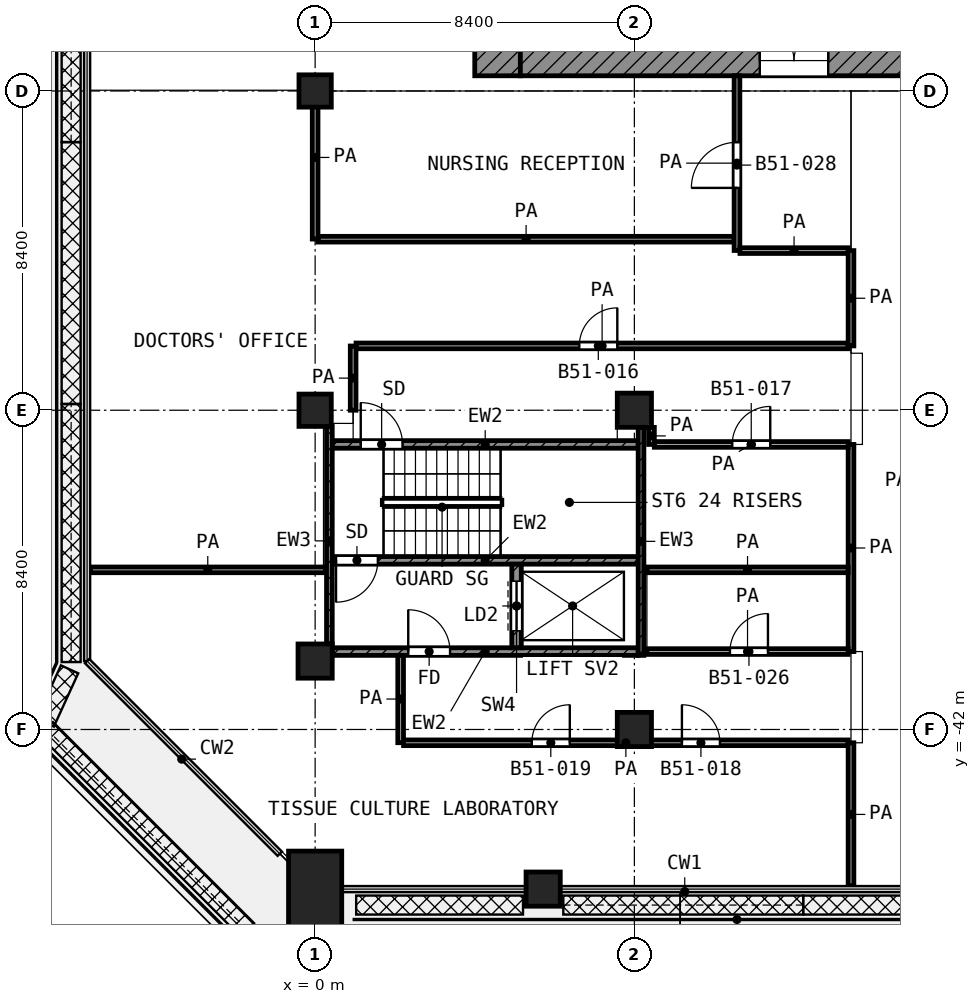
"""IFC4 building model, lengths in metres.
Left out: names, types, materials, properties, quantities, classifications, styles, units other than length and angle.
Written with IfcOpenShell. Run it as: python <this file> out.ifc"""

import sys

from ifc_helpers import new_model, si_unit, direction, frame, frame_2d, origin, origin_2d, place, context, subcontext, project, spatial, rectangle, extrude, element, fill, save


model = new_model("IFC4")
c1 = context("Model", 3, precision=1e-05, world=origin(), true_north=direction((0.0, 1.0)))
c2 = subcontext(c1, "Body", "Model", "MODEL_VIEW")
j1 = project(units=[si_unit("LENGTHUNIT", "METRE"), si_unit("PLANEANGLEUNIT", "RADIAN")], contexts=[c1])
p1 = place(None, origin())
s1 = spatial("IfcSite", under=j1, at=p1, CompositionType="ELEMENT")
p2 = place(p1, origin())
s2 = spatial("IfcBuilding", under=s1, at=p2, CompositionType="ELEMENT")
p3 = place(p2, frame((0.0, 0.0, 222.2)))
s3 = spatial("IfcBuildingStorey", under=s2, at=p3, CompositionType="ELEMENT", Elevation=222.2)
for number, where, z_axis, x_axis in (
    (1, (0.0, -25.2, 0.0), (0.0, 0.0, 1.0), (1.0, 0.0, 0.0)),
    (2, (0.0, -33.6, 0.0), (0.0, 0.0, 1.0), (1.0, 0.0, 0.0)),
):
    element("IfcColumn", number, at=place(p3, frame(where, z_axis=z_axis, x_axis=x_axis)), inside=s3, PredefinedType="COLUMN", context=c2, shape_type="SweptSolid", body=[
        extrude(rectangle(XDim=0.85, YDim=0.85, at=origin_2d()), origin(), (0.0, 0.0, 1.0), 4.2),
    ])
for number, where, z_axis, x_axis in (
    (3, (8.4, -33.6, 0.0), (0.0, 0.0, 1.0), (1.0, 0.0, 0.0)),
    (4, (0.0, -40.2, 0.0), (0.0, 0.0, 1.0), (1.0, 0.0, 0.0)),
    (5, (8.4, -42.0, 0.0), (0.0, 0.0, 1.0), (1.0, 0.0, 0.0)),
    (6, (6.0, -46.2, 0.0), (0.0, 0.0, 1.0), (1.0, 0.0, 0.0)),
):
    element("IfcColumn", number, at=place(p3, frame(where, z_axis=z_axis, x_axis=x_axis)), inside=s3, PredefinedType="COLUMN", context=c2, shape_type="SweptSolid", body=[
        extrude(rectangle(XDim=0.9, YDim=0.9, at=origin_2d()), origin(), (0.0, 0.0, 1.0), 4.2),
    ])
p4 = place(p3, frame((0.0, -46.2, 0.0), z_axis=(0.0, 0.0, 1.0), x_axis=(0.0, 1.0, 0.0)))
e7 = element("IfcColumn", 7, at=p4, inside=s3, PredefinedType="COLUMN", context=c2, shape_type="SweptSolid", body=[
    extrude(rectangle(XDim=2.0, YDim=1.4, at=origin_2d()), origin(), (0.0, 0.0, 1.0), 4.2),
])
p5 = place(p3, frame((4.8, -24.8, 0.0), z_axis=(0.0, 0.0, 1.0), x_axis=(0.0, 1.0, 0.0)))
e8 = element("IfcWall", 8, at=p5, inside=s3, PredefinedType="SHEAR", context=c2, shape_type="SweptSolid", body=[
    extrude(rectangle(XDim=19.4, YDim=1.2, at=frame_2d((9.7, 0.0))), origin(), (0.0, 0.0, 1.0), 3.6),
])
p6 = place(p5, frame((11.25, 0.0, 0.0)))
e9 = element("IfcOpeningElement", 9, at=p6, cuts=e8, PredefinedType="OPENING", context=c2, shape_type="SweptSolid", body=[
    extrude(rectangle(XDim=1.1, YDim=2.1, at=frame_2d((0.55, 1.05))), frame((0.0, 0.61, 0.0), z_axis=(0.0, -1.0, 0.0), x_axis=(1.0, 0.0, 0.0)), (0.0, 0.0, 1.0), 1.22),
])
p7 = place(p5, frame((1.95, 0.0, 0.0)))
e10 = element("IfcOpeningElement", 10, at=p7, cuts=e8, PredefinedType="OPENING", context=c2, shape_type="SweptSolid", body=[
    extrude(rectangle(XDim=1.1, YDim=2.1, at=frame_2d((0.55, 1.05))), frame((0.0, 0.61, 0.0), z_axis=(0.0, -1.0, 0.0), x_axis=(1.0, 0.0, 0.0)), (0.0, 0.0, 1.0), 1.22),
])
p8 = place(p3, frame((5.4, -24.4, 0.0), z_axis=(0.0, 0.0, 1.0), x_axis=(1.0, 0.0, 0.0)))
e11 = element("IfcWall", 11, at=p8, inside=s3, PredefinedType="SHEAR", context=c2, shape_type="SweptSolid", body=[
    extrude(rectangle(XDim=18.6, YDim=0.8, at=frame_2d((9.3, 0.0))), origin(), (0.0, 0.0, 1.0), 3.6),
])
p9 = place(p8, frame((6.3, 0.0, 0.0)))
e12 = element("IfcOpeningElement", 12, at=p9, cuts=e11, PredefinedType="OPENING", context=c2, shape_type="SweptSolid", body=[
    extrude(rectangle(XDim=1.8, YDim=2.1, at=frame_2d((0.9, 1.05))), frame((0.0, 0.41, 0.0), z_axis=(0.0, -1.0, 0.0), x_axis=(1.0, 0.0, 0.0)), (0.0, 0.0, 1.0), 0.82),
])
p10 = place(p3, frame((0.375, -40.05, 0.0), z_axis=(0.0, 0.0, 1.0), x_axis=(0.0, 1.0, 0.0)))
e13 = element("IfcWall", 13, at=p10, inside=s3, PredefinedType="SHEAR", context=c2, shape_type="SweptSolid", body=[
    extrude(rectangle(XDim=6.025, YDim=0.15, at=frame_2d((3.013, 0.0))), origin(), (0.0, 0.0, 1.0), 3.6),
])
p11 = place(p3, frame((8.575, -40.05, 0.0), z_axis=(0.0, 0.0, 1.0), x_axis=(0.0, 1.0, 0.0)))
e14 = element("IfcWall", 14, at=p11, inside=s3, PredefinedType="SHEAR", context=c2, shape_type="SweptSolid", body=[
    extrude(rectangle(XDim=6.0, YDim=0.15, at=frame_2d((3.0, 0.0))), origin(), (0.0, 0.0, 1.0), 3.6),
])
p12 = place(p3, frame((0.45, -34.5, 0.0), z_axis=(0.0, 0.0, 1.0), x_axis=(1.0, 0.0, 0.0)))
e15 = element("IfcWall", 15, at=p12, inside=s3, PredefinedType="SHEAR", context=c2, shape_type="SweptSolid", body=[
    extrude(rectangle(XDim=8.05, YDim=0.2, at=frame_2d((4.025, 0.0))), origin(), (0.0, 0.0, 1.0), 3.6),
])
p13 = place(p12, frame((0.75, 0.0, 0.0)))
e16 = element("IfcOpeningElement", 16, at=p13, cuts=e15, PredefinedType="OPENING", context=c2, shape_type="SweptSolid", body=[
    extrude(rectangle(XDim=1.1, YDim=2.1, at=frame_2d((0.55, 1.05))), frame((0.0, 0.11, 0.0), z_axis=(0.0, -1.0, 0.0), x_axis=(1.0, 0.0, 0.0)), (0.0, 0.0, 1.0), 0.22),
])
p14 = place(p3, frame((0.45, -37.55, 0.0), z_axis=(0.0, 0.0, 1.0), x_axis=(1.0, 0.0, 0.0)))
e17 = element("IfcWall", 17, at=p14, inside=s3, PredefinedType="SHEAR", context=c2, shape_type="SweptSolid", body=[
    extrude(rectangle(XDim=8.05, YDim=0.2, at=frame_2d((4.025, 0.0))), origin(), (0.0, 0.0, 1.0), 3.6),
])
p15 = place(p14, frame((0.1, 0.0, 0.0)))
e18 = element("IfcOpeningElement", 18, at=p15, cuts=e17, PredefinedType="OPENING", context=c2, shape_type="SweptSolid", body=[
    extrude(rectangle(XDim=1.1, YDim=2.1, at=frame_2d((0.55, 1.05))), frame((0.0, 0.11, 0.0), z_axis=(0.0, -1.0, 0.0), x_axis=(1.0, 0.0, 0.0)), (0.0, 0.0, 1.0), 0.22),
])
p16 = place(p3, frame((0.45, -39.95, 0.0), z_axis=(0.0, 0.0, 1.0), x_axis=(1.0, 0.0, 0.0)))
e19 = element("IfcWall", 19, at=p16, inside=s3, PredefinedType="SHEAR", context=c2, shape_type="SweptSolid", body=[
    extrude(rectangle(XDim=8.05, YDim=0.2, at=frame_2d((4.025, 0.0))), origin(), (0.0, 0.0, 1.0), 3.6),
])
p17 = place(p16, frame((2.0, 0.0, 0.0)))
e20 = element("IfcOpeningElement", 20, at=p17, cuts=e19, PredefinedType="OPENING", context=c2, shape_type="SweptSolid", body=[
    extrude(rectangle(XDim=1.1, YDim=2.1, at=frame_2d((0.55, 1.05))), frame((0.0, 0.11, 0.0), z_axis=(0.0, -1.0, 0.0), x_axis=(1.0, 0.0, 0.0)), (0.0, 0.0, 1.0), 0.22),
])
p18 = place(p3, frame((5.3, -39.85, 0.0), z_axis=(0.0, 0.0, 1.0), x_axis=(0.0, 1.0, 0.0)))
e21 = element("IfcWall", 21, at=p18, inside=s3, PredefinedType="SHEAR", context=c2, shape_type="SweptSolid", body=[
    extrude(rectangle(XDim=2.2, YDim=0.25, at=frame_2d((1.1, 0.0))), origin(), (0.0, 0.0, 1.0), 3.6),
])
p19 = place(p18, frame((0.45, 0.0, 0.0)))
e22 = element("IfcOpeningElement", 22, at=p19, cuts=e21, PredefinedType="OPENING", context=c2, shape_type="SweptSolid", body=[
    extrude(rectangle(XDim=1.3, YDim=2.1, at=frame_2d((0.65, 1.05))), frame((0.0, 0.135, 0.0), z_axis=(0.0, -1.0, 0.0), x_axis=(1.0, 0.0, 0.0)), (0.0, 0.0, 1.0), 0.27),
])
p20 = place(p3, frame((2.327, -42.35, 0.0), z_axis=(0.0, 0.0, 1.0), x_axis=(1.0, 0.0, 0.0)))
e23 = element("IfcWall", 23, at=p20, inside=s3, PredefinedType="PARTITIONING", context=c2, shape_type="SweptSolid", body=[
    extrude(rectangle(XDim=11.698, YDim=0.15, at=frame_2d((5.849, 0.0))), origin(), (0.0, 0.0, 1.0), 3.6),
])
p21 = place(p20, frame((7.324, 0.0, 0.0)))
e24 = element("IfcOpeningElement", 24, at=p21, cuts=e23, PredefinedType="OPENING", context=c2, shape_type="SweptSolid", body=[
    extrude(rectangle(XDim=1.0, YDim=2.1, at=frame_2d((0.5, 1.05))), frame((0.0, 0.085, 0.0), z_axis=(0.0, -1.0, 0.0), x_axis=(1.0, 0.0, 0.0)), (0.0, 0.0, 1.0), 0.17),
])
p22 = place(p20, frame((3.374, 0.0, 0.0)))
e25 = element("IfcOpeningElement", 25, at=p22, cuts=e23, PredefinedType="OPENING", context=c2, shape_type="SweptSolid", body=[
    extrude(rectangle(XDim=1.0, YDim=2.1, at=frame_2d((0.5, 1.05))), frame((0.0, 0.085, 0.0), z_axis=(0.0, -1.0, 0.0), x_axis=(1.0, 0.0, 0.0)), (0.0, 0.0, 1.0), 0.17),
])
p23 = place(p3, frame((8.73, -39.95, 0.0), z_axis=(0.0, 0.0, 1.0), x_axis=(1.0, 0.0, 0.0)))
e26 = element("IfcWall", 26, at=p23, inside=s3, PredefinedType="PARTITIONING", context=c2, shape_type="SweptSolid", body=[
    extrude(rectangle(XDim=5.295, YDim=0.15, at=frame_2d((2.647, 0.0))), origin(), (0.0, 0.0, 1.0), 3.6),
])
p24 = place(p23, frame((2.185, 0.0, 0.0)))
e27 = element("IfcOpeningElement", 27, at=p24, cuts=e26, PredefinedType="OPENING", context=c2, shape_type="SweptSolid", body=[
    extrude(rectangle(XDim=1.0, YDim=2.1, at=frame_2d((0.5, 1.05))), frame((0.0, 0.085, 0.0), z_axis=(0.0, -1.0, 0.0), x_axis=(1.0, 0.0, 0.0)), (0.0, 0.0, 1.0), 0.17),
])
p25 = place(p3, frame((-5.92, -37.8, 0.0), z_axis=(0.0, 0.0, 1.0), x_axis=(1.0, 0.0, 0.0)))
e28 = element("IfcWall", 28, at=p25, inside=s3, PredefinedType="PARTITIONING", context=c2, shape_type="SweptSolid", body=[
    extrude(rectangle(XDim=6.19, YDim=0.15, at=frame_2d((3.095, 0.0))), origin(), (0.0, 0.0, 1.0), 3.6),
])
p26 = place(p3, frame((8.73, -37.8, 0.0), z_axis=(0.0, 0.0, 1.0), x_axis=(1.0, 0.0, 0.0)))
e29 = element("IfcWall", 29, at=p26, inside=s3, PredefinedType="PARTITIONING", context=c2, shape_type="SweptSolid", body=[
    extrude(rectangle(XDim=5.295, YDim=0.15, at=frame_2d((2.647, 0.0))), origin(), (0.0, 0.0, 1.0), 3.6),
])
p27 = place(p3, frame((8.925, -34.5, 0.0), z_axis=(0.0, 0.0, 1.0), x_axis=(1.0, 0.0, 0.0)))
e30 = element("IfcWall", 30, at=p27, inside=s3, PredefinedType="PARTITIONING", context=c2, shape_type="SweptSolid", body=[
    extrude(rectangle(XDim=5.1, YDim=0.15, at=frame_2d((2.55, 0.0))), origin(), (0.0, 0.0, 1.0), 3.6),
])
p28 = place(p27, frame((2.05, 0.0, 0.0)))
e31 = element("IfcOpeningElement", 31, at=p28, cuts=e30, PredefinedType="OPENING", context=c2, shape_type="SweptSolid", body=[
    extrude(rectangle(XDim=1.0, YDim=2.1, at=frame_2d((0.5, 1.05))), frame((0.0, 0.085, 0.0), z_axis=(0.0, -1.0, 0.0), x_axis=(1.0, 0.0, 0.0)), (0.0, 0.0, 1.0), 0.17),
])
p29 = place(p3, frame((1.077, -31.907, 0.0), z_axis=(0.0, 0.0, 1.0), x_axis=(1.0, 0.0, 0.0)))
e32 = element("IfcWall", 32, at=p29, inside=s3, PredefinedType="PARTITIONING", context=c2, shape_type="SweptSolid", body=[
    extrude(rectangle(XDim=12.948, YDim=0.15, at=frame_2d((6.474, 0.0))), origin(), (0.0, 0.0, 1.0), 3.6),
])
p30 = place(p29, frame((5.874, 0.0, 0.0)))
e33 = element("IfcOpeningElement", 33, at=p30, cuts=e32, PredefinedType="OPENING", context=c2, shape_type="SweptSolid", body=[
    extrude(rectangle(XDim=1.0, YDim=2.1, at=frame_2d((0.5, 1.05))), frame((0.0, 0.085, 0.0), z_axis=(0.0, -1.0, 0.0), x_axis=(1.0, 0.0, 0.0)), (0.0, 0.0, 1.0), 0.17),
])
p31 = place(p3, frame((11.178, -29.4, 0.0), z_axis=(0.0, 0.0, 1.0), x_axis=(1.0, 0.0, 0.0)))
e34 = element("IfcWall", 34, at=p31, inside=s3, PredefinedType="PARTITIONING", context=c2, shape_type="SweptSolid", body=[
    extrude(rectangle(XDim=2.847, YDim=0.15, at=frame_2d((1.423, 0.0))), origin(), (0.0, 0.0, 1.0), 3.6),
])
p32 = place(p3, frame((0.077, -29.1, 0.0), z_axis=(0.0, 0.0, 1.0), x_axis=(1.0, 0.0, 0.0)))
e35 = element("IfcWall", 35, at=p32, inside=s3, PredefinedType="PARTITIONING", context=c2, shape_type="SweptSolid", body=[
    extrude(rectangle(XDim=10.948, YDim=0.15, at=frame_2d((5.474, 0.0))), origin(), (0.0, 0.0, 1.0), 3.6),
])
p33 = place(p3, frame((0.0, -29.097, 0.0), z_axis=(0.0, 0.0, 1.0), x_axis=(0.0, 1.0, 0.0)))
e36 = element("IfcWall", 36, at=p33, inside=s3, PredefinedType="PARTITIONING", context=c2, shape_type="SweptSolid", body=[
    extrude(rectangle(XDim=4.297, YDim=0.15, at=frame_2d((2.148, 0.0))), origin(), (0.0, 0.0, 1.0), 3.6),
])
p34 = place(p3, frame((1.0, -33.6, 0.0), z_axis=(0.0, 0.0, 1.0), x_axis=(0.0, 1.0, 0.0)))
e37 = element("IfcWall", 37, at=p34, inside=s3, PredefinedType="PARTITIONING", context=c2, shape_type="SweptSolid", body=[
    extrude(rectangle(XDim=1.69, YDim=0.15, at=frame_2d((0.845, 0.0))), origin(), (0.0, 0.0, 1.0), 3.6),
])
p35 = place(p3, frame((2.25, -42.348, 0.0), z_axis=(0.0, 0.0, 1.0), x_axis=(0.0, 1.0, 0.0)))
e38 = element("IfcWall", 38, at=p35, inside=s3, PredefinedType="PARTITIONING", context=c2, shape_type="SweptSolid", body=[
    extrude(rectangle(XDim=2.298, YDim=0.15, at=frame_2d((1.149, 0.0))), origin(), (0.0, 0.0, 1.0), 3.6),
])
p36 = place(p3, frame((8.85, -34.5, 0.0), z_axis=(0.0, 0.0, 1.0), x_axis=(0.0, 1.0, 0.0)))
e39 = element("IfcWall", 39, at=p36, inside=s3, PredefinedType="PARTITIONING", context=c2, shape_type="SweptSolid", body=[
    extrude(rectangle(XDim=0.449, YDim=0.15, at=frame_2d((0.225, 0.0))), origin(), (0.0, 0.0, 1.0), 3.6),
])
p37 = place(p3, frame((11.1, -29.397, 0.0), z_axis=(0.0, 0.0, 1.0), x_axis=(0.0, 1.0, 0.0)))
e40 = element("IfcWall", 40, at=p37, inside=s3, PredefinedType="PARTITIONING", context=c2, shape_type="SweptSolid", body=[
    extrude(rectangle(XDim=4.597, YDim=0.15, at=frame_2d((2.298, 0.0))), origin(), (0.0, 0.0, 1.0), 3.6),
])
p38 = place(p37, frame((1.647, 0.0, 0.0)))
e41 = element("IfcOpeningElement", 41, at=p38, cuts=e40, PredefinedType="OPENING", context=c2, shape_type="SweptSolid", body=[
    extrude(rectangle(XDim=1.2, YDim=2.1, at=frame_2d((0.6, 1.05))), frame((0.0, 0.085, 0.0), z_axis=(0.0, -1.0, 0.0), x_axis=(1.0, 0.0, 0.0)), (0.0, 0.0, 1.0), 0.17),
])
p39 = place(p3, frame((14.1, -46.12, 0.0), z_axis=(0.0, 0.0, 1.0), x_axis=(0.0, 1.0, 0.0)))
e42 = element("IfcWall", 42, at=p39, inside=s3, PredefinedType="PARTITIONING", context=c2, shape_type="SweptSolid", body=[
    extrude(rectangle(XDim=3.77, YDim=0.15, at=frame_2d((1.885, 0.0))), origin(), (0.0, 0.0, 1.0), 3.6),
])
p40 = place(p3, frame((14.1, -39.95, 0.0), z_axis=(0.0, 0.0, 1.0), x_axis=(0.0, 1.0, 0.0)))
e43 = element("IfcWall", 43, at=p40, inside=s3, PredefinedType="PARTITIONING", context=c2, shape_type="SweptSolid", body=[
    extrude(rectangle(XDim=5.45, YDim=0.15, at=frame_2d((2.725, 0.0))), origin(), (0.0, 0.0, 1.0), 3.6),
])
p41 = place(p3, frame((14.1, -31.907, 0.0), z_axis=(0.0, 0.0, 1.0), x_axis=(0.0, 1.0, 0.0)))
e44 = element("IfcWall", 44, at=p41, inside=s3, PredefinedType="PARTITIONING", context=c2, shape_type="SweptSolid", body=[
    extrude(rectangle(XDim=2.507, YDim=0.15, at=frame_2d((1.253, 0.0))), origin(), (0.0, 0.0, 1.0), 3.6),
])
p42 = place(p9, origin())
e45 = element("IfcDoor", 45, at=p42, inside=s3, OperationType="DOUBLE_DOOR_SINGLE_SWING", PredefinedType="DOOR", context=c2, shape_type="SweptSolid", body=[
    extrude(rectangle(XDim=1.8, YDim=2.1, at=frame_2d((0.9, 1.05))), frame((0.0, 0.025, 0.0), z_axis=(0.0, -1.0, 0.0), x_axis=(1.0, 0.0, 0.0)), (0.0, 0.0, 1.0), 0.05),
])
fill(e12, e45)
p43 = place(p13, origin())
e46 = element("IfcDoor", 46, at=p43, inside=s3, OperationType="SINGLE_SWING_LEFT", PredefinedType="DOOR", context=c2, shape_type="SweptSolid", body=[
    extrude(rectangle(XDim=1.1, YDim=2.1, at=frame_2d((0.55, 1.05))), frame((0.0, 0.025, 0.0), z_axis=(0.0, -1.0, 0.0), x_axis=(1.0, 0.0, 0.0)), (0.0, 0.0, 1.0), 0.05),
])
fill(e16, e46)
p44 = place(p15, frame((1.1, 0.0, 0.0), z_axis=(0.0, 0.0, 1.0), x_axis=(-1.0, 0.0, 0.0)))
e47 = element("IfcDoor", 47, at=p44, inside=s3, OperationType="SINGLE_SWING_LEFT", PredefinedType="DOOR", context=c2, shape_type="SweptSolid", body=[
    extrude(rectangle(XDim=1.1, YDim=2.1, at=frame_2d((0.55, 1.05))), frame((0.0, 0.025, 0.0), z_axis=(0.0, -1.0, 0.0), x_axis=(1.0, 0.0, 0.0)), (0.0, 0.0, 1.0), 0.05),
])
fill(e18, e47)
p45 = place(p19, origin())
e48 = element("IfcDoor", 48, at=p45, inside=s3, OperationType="DOUBLE_DOOR_SLIDING", PredefinedType="DOOR", context=c2, shape_type="SweptSolid", body=[
    extrude(rectangle(XDim=1.3, YDim=2.1, at=frame_2d((0.65, 1.05))), frame((0.0, 0.025, 0.0), z_axis=(0.0, -1.0, 0.0), x_axis=(1.0, 0.0, 0.0)), (0.0, 0.0, 1.0), 0.05),
])
fill(e22, e48)
p46 = place(p17, origin())
e49 = element("IfcDoor", 49, at=p46, inside=s3, OperationType="SINGLE_SWING_LEFT", PredefinedType="DOOR", context=c2, shape_type="SweptSolid", body=[
    extrude(rectangle(XDim=1.1, YDim=2.1, at=frame_2d((0.55, 1.05))), frame((0.0, 0.025, 0.0), z_axis=(0.0, -1.0, 0.0), x_axis=(1.0, 0.0, 0.0)), (0.0, 0.0, 1.0), 0.05),
])
fill(e20, e49)
p47 = place(p38, origin())
e50 = element("IfcDoor", 50, at=p47, inside=s3, OperationType="SINGLE_SWING_LEFT", PredefinedType="DOOR", context=c2, shape_type="SweptSolid", body=[
    extrude(rectangle(XDim=1.2, YDim=2.1, at=frame_2d((0.6, 1.05))), frame((0.0, 0.025, 0.0), z_axis=(0.0, -1.0, 0.0), x_axis=(1.0, 0.0, 0.0)), (0.0, 0.0, 1.0), 0.05),
])
fill(e41, e50)
p48 = place(p30, origin())
e51 = element("IfcDoor", 51, at=p48, inside=s3, OperationType="SINGLE_SWING_RIGHT", PredefinedType="DOOR", context=c2, shape_type="SweptSolid", body=[
    extrude(rectangle(XDim=1.0, YDim=2.1, at=frame_2d((0.5, 1.05))), frame((0.0, 0.025, 0.0), z_axis=(0.0, -1.0, 0.0), x_axis=(1.0, 0.0, 0.0)), (0.0, 0.0, 1.0), 0.05),
])
fill(e33, e51)
p49 = place(p28, origin())
e52 = element("IfcDoor", 52, at=p49, inside=s3, OperationType="SINGLE_SWING_RIGHT", PredefinedType="DOOR", context=c2, shape_type="SweptSolid", body=[
    extrude(rectangle(XDim=1.0, YDim=2.1, at=frame_2d((0.5, 1.05))), frame((0.0, 0.025, 0.0), z_axis=(0.0, -1.0, 0.0), x_axis=(1.0, 0.0, 0.0)), (0.0, 0.0, 1.0), 0.05),
])
fill(e31, e52)
p50 = place(p21, origin())
e53 = element("IfcDoor", 53, at=p50, inside=s3, OperationType="SINGLE_SWING_LEFT", PredefinedType="DOOR", context=c2, shape_type="SweptSolid", body=[
    extrude(rectangle(XDim=1.0, YDim=2.1, at=frame_2d((0.5, 1.05))), frame((0.0, 0.025, 0.0), z_axis=(0.0, -1.0, 0.0), x_axis=(1.0, 0.0, 0.0)), (0.0, 0.0, 1.0), 0.05),
])
fill(e24, e53)
p51 = place(p22, origin())
e54 = element("IfcDoor", 54, at=p51, inside=s3, OperationType="SINGLE_SWING_RIGHT", PredefinedType="DOOR", context=c2, shape_type="SweptSolid", body=[
    extrude(rectangle(XDim=1.0, YDim=2.1, at=frame_2d((0.5, 1.05))), frame((0.0, 0.025, 0.0), z_axis=(0.0, -1.0, 0.0), x_axis=(1.0, 0.0, 0.0)), (0.0, 0.0, 1.0), 0.05),
])
fill(e25, e54)
p52 = place(p24, origin())
e55 = element("IfcDoor", 55, at=p52, inside=s3, OperationType="SINGLE_SWING_RIGHT", PredefinedType="DOOR", context=c2, shape_type="SweptSolid", body=[
    extrude(rectangle(XDim=1.0, YDim=2.1, at=frame_2d((0.5, 1.05))), frame((0.0, 0.025, 0.0), z_axis=(0.0, -1.0, 0.0), x_axis=(1.0, 0.0, 0.0)), (0.0, 0.0, 1.0), 0.05),
])
fill(e27, e55)
save(model, sys.argv[1])
